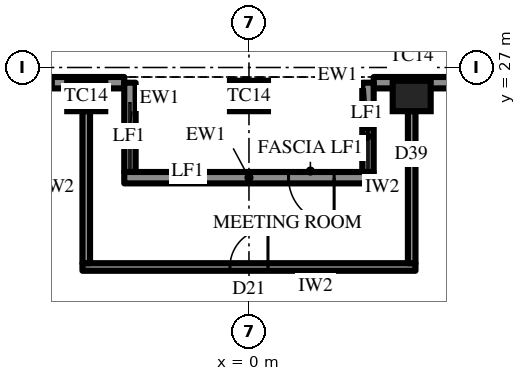
"""IFC4 building model, lengths in metres.
Left out: names, types, materials, properties, quantities, classifications, styles, units other than length and angle.
Written with IfcOpenShell. Run it as: python <this file> out.ifc"""

import sys

from ifc_helpers import new_model, si_unit, direction, frame, frame_2d, origin, origin_2d, place, context, subcontext, project, spatial, rectangle, extrude, element, fill, save


model = new_model("IFC4")
c1 = context("Model", 3, precision=1e-05, world=origin(), true_north=direction((0.0, 1.0)))
c2 = subcontext(c1, "Body", "Model", "MODEL_VIEW")
j1 = project(units=[si_unit("LENGTHUNIT", "METRE"), si_unit("PLANEANGLEUNIT", "RADIAN")], contexts=[c1])
p1 = place(None, origin())
s1 = spatial("IfcSite", under=j1, at=p1, CompositionType="ELEMENT")
p2 = place(p1, origin())
s2 = spatial("IfcBuilding", under=s1, at=p2, CompositionType="ELEMENT")
p3 = place(p2, frame((0.0, 0.0, 340.9)))
s3 = spatial("IfcBuildingStorey", under=s2, at=p3, CompositionType="ELEMENT", Elevation=340.9)
for number, where, z_axis, x_axis in (
    (1, (4.282, 26.25, 0.0), (0.0, 0.0, 1.0), (-1.0, 0.0, 0.0)),
    (2, (0.0, 26.25, 0.0), (0.0, 0.0, 1.0), (-1.0, 0.0, 0.0)),
    (3, (-4.282, 26.25, 0.0), (0.0, 0.0, 1.0), (-1.0, 0.0, 0.0)),
):
    element("IfcColumn", number, at=place(p3, frame(where, z_axis=z_axis, x_axis=x_axis)), inside=s3, PredefinedType="COLUMN", context=c2, shape_type="SweptSolid", body=[
        extrude(rectangle(XDim=1.0, YDim=0.8, at=origin_2d()), origin(), (0.0, 0.0, 1.0), 4.2),
    ])
p4 = place(p3, frame((12.846, 26.6, 0.0), z_axis=(0.0, 0.0, 1.0), x_axis=(-1.0, 0.0, 0.0)))
e4 = element("IfcWall", 4, at=p4, inside=s3, PredefinedType="SOLIDWALL", context=c2, shape_type="SweptSolid", body=[
    extrude(rectangle(XDim=9.564, YDim=0.3, at=frame_2d((4.782, 0.0))), origin(), (0.0, 0.0, 1.0), 2.9),
])
p5 = place(p4, frame((0.866, 0.0, 0.6)))
e5 = element("IfcOpeningElement", 5, at=p5, cuts=e4, PredefinedType="OPENING", context=c2, shape_type="SweptSolid", body=[
    extrude(rectangle(XDim=2.55, YDim=2.05, at=frame_2d((1.275, 1.025))), frame((0.0, 0.16, 0.0), z_axis=(0.0, -1.0, 0.0), x_axis=(1.0, 0.0, 0.0)), (0.0, 0.0, 1.0), 0.32),
])
p6 = place(p4, frame((5.823, 0.0, 0.0)))
e6 = element("IfcOpeningElement", 6, at=p6, cuts=e4, PredefinedType="OPENING", context=c2, shape_type="SweptSolid", body=[
    extrude(rectangle(XDim=1.2, YDim=2.4, at=frame_2d((0.6, 1.2))), frame((0.0, 0.16, 0.0), z_axis=(0.0, -1.0, 0.0), x_axis=(1.0, 0.0, 0.0)), (0.0, 0.0, 1.0), 0.32),
])
p7 = place(p3, frame((-3.282, 26.6, 0.0), z_axis=(0.0, 0.0, 1.0), x_axis=(-1.0, 0.0, 0.0)))
e7 = element("IfcWall", 7, at=p7, inside=s3, PredefinedType="SOLIDWALL", context=c2, shape_type="SweptSolid", body=[
    extrude(rectangle(XDim=9.564, YDim=0.3, at=frame_2d((4.782, 0.0))), origin(), (0.0, 0.0, 1.0), 2.9),
])
p8 = place(p7, frame((1.866, 0.0, 0.6)))
e8 = element("IfcOpeningElement", 8, at=p8, cuts=e7, PredefinedType="OPENING", context=c2, shape_type="SweptSolid", body=[
    extrude(rectangle(XDim=2.55, YDim=2.05, at=frame_2d((1.275, 1.025))), frame((0.0, 0.16, 0.0), z_axis=(0.0, -1.0, 0.0), x_axis=(1.0, 0.0, 0.0)), (0.0, 0.0, 1.0), 0.32),
])
p9 = place(p7, frame((6.148, 0.0, 0.6)))
e9 = element("IfcOpeningElement", 9, at=p9, cuts=e7, PredefinedType="OPENING", context=c2, shape_type="SweptSolid", body=[
    extrude(rectangle(XDim=2.55, YDim=2.05, at=frame_2d((1.275, 1.025))), frame((0.0, 0.16, 0.0), z_axis=(0.0, -1.0, 0.0), x_axis=(1.0, 0.0, 0.0)), (0.0, 0.0, 1.0), 0.32),
])
for number, where, z_axis, x_axis in (
    (10, (3.132, 26.6, 0.0), (0.0, 0.0, 1.0), (0.0, -1.0, 0.0)),
    (11, (-3.132, 26.6, 0.0), (0.0, 0.0, 1.0), (0.0, -1.0, 0.0)),
):
    element("IfcWall", number, at=place(p3, frame(where, z_axis=z_axis, x_axis=x_axis)), inside=s3, PredefinedType="SOLIDWALL", context=c2, shape_type="SweptSolid", body=[
        extrude(rectangle(XDim=2.35, YDim=0.3, at=frame_2d((1.175, 0.0))), origin(), (0.0, 0.0, 1.0), 2.9),
    ])
p10 = place(p3, frame((3.282, 24.1, 0.0), z_axis=(0.0, 0.0, 1.0), x_axis=(-1.0, 0.0, 0.0)))
e12 = element("IfcWall", 12, at=p10, inside=s3, PredefinedType="SOLIDWALL", context=c2, shape_type="SweptSolid", body=[
    extrude(rectangle(XDim=6.564, YDim=0.3, at=frame_2d((3.282, 0.0))), origin(), (0.0, 0.0, 1.0), 2.9),
])
p11 = place(p10, frame((1.041, 0.0, 0.0)))
e13 = element("IfcOpeningElement", 13, at=p11, cuts=e12, PredefinedType="OPENING", context=c2, shape_type="SweptSolid", body=[
    extrude(rectangle(XDim=1.2, YDim=2.4, at=frame_2d((0.6, 1.2))), frame((0.0, 0.16, 0.0), z_axis=(0.0, -1.0, 0.0), x_axis=(1.0, 0.0, 0.0)), (0.0, 0.0, 1.0), 0.32),
])
p12 = place(p3, frame((4.382, 21.75, 0.0), z_axis=(0.0, 0.0, 1.0), x_axis=(-1.0, 0.0, 0.0)))
e14 = element("IfcWall", 14, at=p12, inside=s3, PredefinedType="PARTITIONING", context=c2, shape_type="SweptSolid", body=[
    extrude(rectangle(XDim=8.764, YDim=0.2, at=frame_2d((4.382, 0.0))), origin(), (0.0, 0.0, 1.0), 4.0),
])
p13 = place(p12, frame((3.882, 0.0, 0.0)))
e15 = element("IfcOpeningElement", 15, at=p13, cuts=e14, PredefinedType="OPENING", context=c2, shape_type="SweptSolid", body=[
    extrude(rectangle(XDim=1.0, YDim=2.2, at=frame_2d((0.5, 1.1))), frame((0.0, 0.11, 0.0), z_axis=(0.0, -1.0, 0.0), x_axis=(1.0, 0.0, 0.0)), (0.0, 0.0, 1.0), 0.22),
])
for number, where, z_axis, x_axis in (
    (16, (4.282, 21.85, 0.0), (0.0, 0.0, 1.0), (0.0, 1.0, 0.0)),
    (17, (-4.282, 21.85, 0.0), (0.0, 0.0, 1.0), (0.0, 1.0, 0.0)),
):
    element("IfcWall", number, at=place(p3, frame(where, z_axis=z_axis, x_axis=x_axis)), inside=s3, PredefinedType="PARTITIONING", context=c2, shape_type="SweptSolid", body=[
        extrude(rectangle(XDim=4.0, YDim=0.2, at=frame_2d((2.0, 0.0))), origin(), (0.0, 0.0, 1.0), 2.992),
    ])
p14 = place(p8, origin())
e18 = element("IfcWindow", 18, at=p14, inside=s3, PartitioningType="SINGLE_PANEL", PredefinedType="WINDOW", context=c2, shape_type="SweptSolid", body=[
    extrude(rectangle(XDim=2.55, YDim=2.05, at=frame_2d((1.275, 1.025))), frame((0.0, 0.03, 0.0), z_axis=(0.0, -1.0, 0.0), x_axis=(1.0, 0.0, 0.0)), (0.0, 0.0, 1.0), 0.06),
])
fill(e8, e18)
p15 = place(p11, origin())
e19 = element("IfcDoor", 19, at=p15, inside=s3, OperationType="SINGLE_SWING_RIGHT", PredefinedType="DOOR", context=c2, shape_type="SweptSolid", body=[
    extrude(rectangle(XDim=1.2, YDim=2.4, at=frame_2d((0.6, 1.2))), frame((0.0, 0.025, 0.0), z_axis=(0.0, -1.0, 0.0), x_axis=(1.0, 0.0, 0.0)), (0.0, 0.0, 1.0), 0.05),
])
fill(e13, e19)
p16 = place(p13, frame((1.0, 0.0, 0.0), z_axis=(0.0, 0.0, 1.0), x_axis=(-1.0, 0.0, 0.0)))
e20 = element("IfcDoor", 20, at=p16, inside=s3, OperationType="SINGLE_SWING_LEFT", PredefinedType="DOOR", context=c2, shape_type="SweptSolid", body=[
    extrude(rectangle(XDim=1.0, YDim=2.2, at=frame_2d((0.5, 1.1))), frame((0.0, 0.025, 0.0), z_axis=(0.0, -1.0, 0.0), x_axis=(1.0, 0.0, 0.0)), (0.0, 0.0, 1.0), 0.05),
])
fill(e15, e20)
save(model, sys.argv[1])
